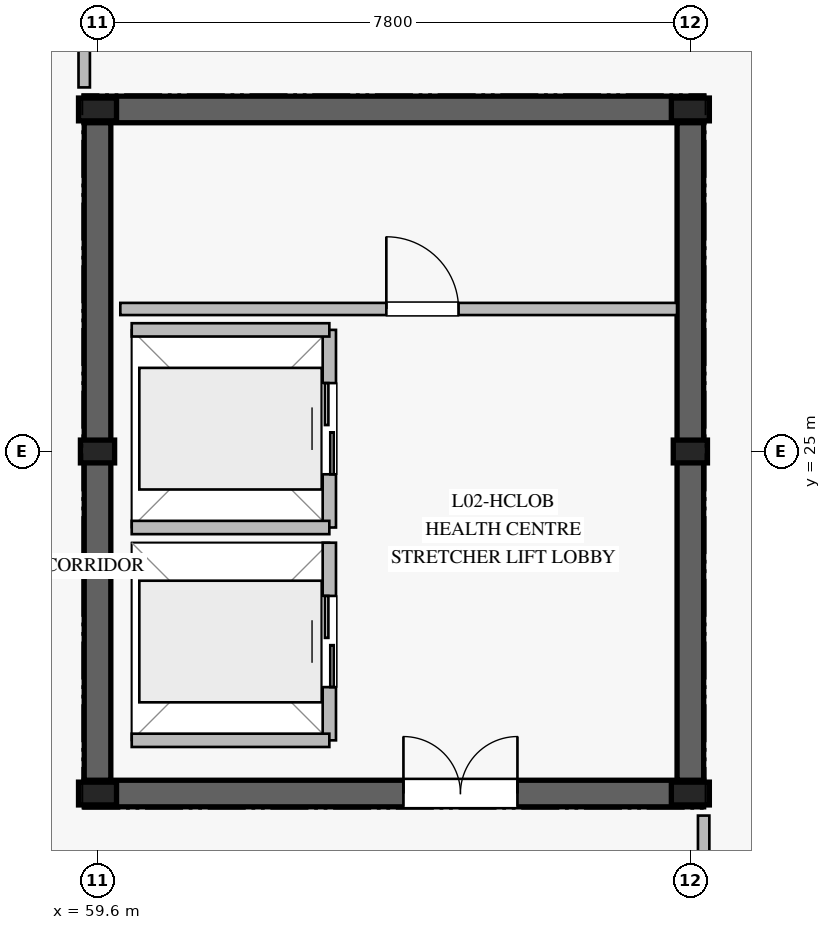
"""IFC4 building model, lengths in metres.
Left out: names, types, materials, properties, quantities, classifications, styles, units other than length and angle.
Written with IfcOpenShell. Run it as: python <this file> out.ifc"""

import sys

from ifc_helpers import new_model, si_unit, direction, frame, frame_2d, origin, origin_2d, place, context, subcontext, project, spatial, rectangle, i_section, extrude, element, fill, save


model = new_model("IFC4")
c1 = context("Model", 3, precision=1e-05, world=origin(), true_north=direction((0.0, 1.0)))
c2 = subcontext(c1, "Body", "Model", "MODEL_VIEW")
j1 = project(units=[si_unit("LENGTHUNIT", "METRE"), si_unit("PLANEANGLEUNIT", "RADIAN")], contexts=[c1])
p1 = place(None, origin())
s1 = spatial("IfcSite", under=j1, at=p1, CompositionType="ELEMENT")
p2 = place(p1, origin())
s2 = spatial("IfcBuilding", under=s1, at=p2, CompositionType="ELEMENT")
p3 = place(p2, frame((0.0, 0.0, 9.8)))
s3 = spatial("IfcBuildingStorey", under=s2, at=p3, CompositionType="ELEMENT", Elevation=9.8)
p4 = place(p3, frame((59.425, 20.5, 0.0), z_axis=(0.0, 0.0, 1.0), x_axis=(1.0, 0.0, 0.0)))
e1 = element("IfcWall", 1, at=p4, inside=s3, PredefinedType="SHEAR", context=c2, shape_type="SweptSolid", body=[
    extrude(rectangle(XDim=8.15, YDim=0.35, at=frame_2d((4.075, 0.0))), origin(), (0.0, 0.0, 1.0), 4.34),
])
p5 = place(p4, frame((4.2, 0.0, 0.0)))
e2 = element("IfcOpeningElement", 2, at=p5, cuts=e1, PredefinedType="OPENING", context=c2, shape_type="SweptSolid", body=[
    extrude(rectangle(XDim=1.5, YDim=2.2, at=frame_2d((0.75, 1.1))), frame((0.0, 0.185, 0.0), z_axis=(0.0, -1.0, 0.0), x_axis=(1.0, 0.0, 0.0)), (0.0, 0.0, 1.0), 0.37),
])
p6 = place(p3, frame((67.575, 29.5, 0.0), z_axis=(0.0, 0.0, 1.0), x_axis=(-1.0, 0.0, 0.0)))
e3 = element("IfcWall", 3, at=p6, inside=s3, PredefinedType="SHEAR", context=c2, shape_type="SweptSolid", body=[
    extrude(rectangle(XDim=8.15, YDim=0.35, at=frame_2d((4.075, 0.0))), origin(), (0.0, 0.0, 1.0), 4.34),
])
for number, where, z_axis, x_axis in (
    (4, (59.6, 29.325, 0.0), (0.0, 0.0, 1.0), (0.0, -1.0, 0.0)),
    (5, (67.4, 20.675, 0.0), (0.0, 0.0, 1.0), (0.0, 1.0, 0.0)),
):
    element("IfcWall", number, at=place(p3, frame(where, z_axis=z_axis, x_axis=x_axis)), inside=s3, PredefinedType="SHEAR", context=c2, shape_type="SweptSolid", body=[
        extrude(rectangle(XDim=8.65, YDim=0.35, at=frame_2d((4.325, 0.0))), origin(), (0.0, 0.0, 1.0), 4.34),
    ])
for number, where, z_axis, x_axis in (
    (6, (59.6, 20.5, 0.0), (0.0, 0.0, 1.0), (1.0, 0.0, 0.0)),
    (7, (67.4, 20.5, 0.0), (0.0, 0.0, 1.0), (1.0, 0.0, 0.0)),
    (8, (67.4, 29.5, 0.0), (0.0, 0.0, 1.0), (1.0, 0.0, 0.0)),
    (9, (59.6, 29.5, 0.0), (0.0, 0.0, 1.0), (1.0, 0.0, 0.0)),
):
    element("IfcColumn", number, at=place(p3, frame(where, z_axis=z_axis, x_axis=x_axis)), inside=s3, PredefinedType="COLUMN", context=c2, shape_type="SweptSolid", body=[
        extrude(i_section(OverallWidth=0.3, OverallDepth=0.5, WebThickness=0.014, FlangeThickness=0.028, at=origin_2d()), origin(), (0.0, 0.0, 1.0), 4.6),
    ])
for number, where, z_axis, x_axis in (
    (10, (59.6, 25.0, 0.0), (0.0, 0.0, 1.0), (1.0, 0.0, 0.0)),
    (11, (67.4, 25.0, 0.0), (0.0, 0.0, 1.0), (1.0, 0.0, 0.0)),
):
    element("IfcColumn", number, at=place(p3, frame(where, z_axis=z_axis, x_axis=x_axis)), inside=s3, PredefinedType="COLUMN", context=c2, shape_type="SweptSolid", body=[
        extrude(i_section(OverallWidth=0.3, OverallDepth=0.45, WebThickness=0.014, FlangeThickness=0.026, at=origin_2d()), origin(), (0.0, 0.0, 1.0), 4.6),
    ])
p7 = place(p3, frame((62.65, 21.2, 0.0), z_axis=(0.0, 0.0, 1.0), x_axis=(0.0, 1.0, 0.0)))
e12 = element("IfcWall", 12, at=p7, inside=s3, PredefinedType="PARTITIONING", context=c2, shape_type="SweptSolid", body=[
    extrude(rectangle(XDim=2.6, YDim=0.175, at=frame_2d((1.3, 0.0))), origin(), (0.0, 0.0, 1.0), 4.34),
])
p8 = place(p7, frame((0.7, 0.0, 0.0)))
e13 = element("IfcOpeningElement", 13, at=p8, cuts=e12, PredefinedType="OPENING", context=c2, shape_type="SweptSolid", body=[
    extrude(rectangle(XDim=1.2, YDim=2.2, at=frame_2d((0.6, 1.1))), frame((0.0, 0.098, 0.0), z_axis=(0.0, -1.0, 0.0), x_axis=(1.0, 0.0, 0.0)), (0.0, 0.0, 1.0), 0.195),
])
p9 = place(p3, frame((60.05, 21.2, 0.0), z_axis=(0.0, 0.0, 1.0), x_axis=(1.0, 0.0, 0.0)))
e14 = element("IfcWall", 14, at=p9, inside=s3, PredefinedType="PARTITIONING", context=c2, shape_type="SweptSolid", body=[
    extrude(rectangle(XDim=2.6, YDim=0.175, at=frame_2d((1.3, 0.0))), origin(), (0.0, 0.0, 1.0), 4.34),
])
p10 = place(p3, frame((62.65, 24.0, 0.0), z_axis=(0.0, 0.0, 1.0), x_axis=(0.0, 1.0, 0.0)))
e15 = element("IfcWall", 15, at=p10, inside=s3, PredefinedType="PARTITIONING", context=c2, shape_type="SweptSolid", body=[
    extrude(rectangle(XDim=2.6, YDim=0.175, at=frame_2d((1.3, 0.0))), origin(), (0.0, 0.0, 1.0), 3.98),
])
p11 = place(p10, frame((0.7, 0.0, 0.0)))
e16 = element("IfcOpeningElement", 16, at=p11, cuts=e15, PredefinedType="OPENING", context=c2, shape_type="SweptSolid", body=[
    extrude(rectangle(XDim=1.2, YDim=2.2, at=frame_2d((0.6, 1.1))), frame((0.0, 0.098, 0.0), z_axis=(0.0, -1.0, 0.0), x_axis=(1.0, 0.0, 0.0)), (0.0, 0.0, 1.0), 0.195),
])
for number, where, z_axis, x_axis in (
    (17, (60.05, 24.0, 0.0), (0.0, 0.0, 1.0), (1.0, 0.0, 0.0)),
    (18, (60.05, 26.6, 0.0), (0.0, 0.0, 1.0), (1.0, 0.0, 0.0)),
):
    element("IfcWall", number, at=place(p3, frame(where, z_axis=z_axis, x_axis=x_axis)), inside=s3, PredefinedType="PARTITIONING", context=c2, shape_type="SweptSolid", body=[
        extrude(rectangle(XDim=2.6, YDim=0.175, at=frame_2d((1.3, 0.0))), origin(), (0.0, 0.0, 1.0), 4.34),
    ])
p12 = place(p3, frame((59.9, 26.875, 0.0), z_axis=(0.0, 0.0, 1.0), x_axis=(1.0, 0.0, 0.0)))
e19 = element("IfcWall", 19, at=p12, inside=s3, PredefinedType="PLUMBINGWALL", context=c2, shape_type="SweptSolid", body=[
    extrude(rectangle(XDim=7.325, YDim=0.16, at=frame_2d((3.663, 0.0))), origin(), (0.0, 0.0, 1.0), 3.98),
])
p13 = place(p12, frame((3.5, 0.0, 0.0)))
e20 = element("IfcOpeningElement", 20, at=p13, cuts=e19, PredefinedType="OPENING", context=c2, shape_type="SweptSolid", body=[
    extrude(rectangle(XDim=0.95, YDim=2.1, at=frame_2d((0.475, 1.05))), frame((0.0, 0.09, 0.0), z_axis=(0.0, -1.0, 0.0), x_axis=(1.0, 0.0, 0.0)), (0.0, 0.0, 1.0), 0.18),
])
for number, where, z_axis, x_axis in (
    (21, (59.425, 29.79, 0.0), (0.0, 0.0, 1.0), (0.0, 1.0, 0.0)),
    (22, (67.575, 19.265, 0.0), (0.0, 0.0, 1.0), (0.0, 1.0, 0.0)),
):
    element("IfcWall", number, at=place(p3, frame(where, z_axis=z_axis, x_axis=x_axis)), inside=s3, PredefinedType="PARTITIONING", context=c2, shape_type="SweptSolid", body=[
        extrude(rectangle(XDim=0.945, YDim=0.15, at=frame_2d((0.473, 0.0))), origin(), (0.0, 0.0, 1.0), 3.98),
    ])
p14 = place(p8, origin())
e23 = element("IfcDoor", 23, at=p14, inside=s3, OperationType="DOUBLE_DOOR_SLIDING", PredefinedType="DOOR", context=c2, shape_type="SweptSolid", body=[
    extrude(rectangle(XDim=1.2, YDim=2.2, at=frame_2d((0.6, 1.1))), frame((0.0, 0.025, 0.0), z_axis=(0.0, -1.0, 0.0), x_axis=(1.0, 0.0, 0.0)), (0.0, 0.0, 1.0), 0.05),
])
fill(e13, e23)
p15 = place(p11, origin())
e24 = element("IfcDoor", 24, at=p15, inside=s3, OperationType="DOUBLE_DOOR_SLIDING", PredefinedType="DOOR", context=c2, shape_type="SweptSolid", body=[
    extrude(rectangle(XDim=1.2, YDim=2.2, at=frame_2d((0.6, 1.1))), frame((0.0, 0.025, 0.0), z_axis=(0.0, -1.0, 0.0), x_axis=(1.0, 0.0, 0.0)), (0.0, 0.0, 1.0), 0.05),
])
fill(e16, e24)
p16 = place(p5, origin())
e25 = element("IfcDoor", 25, at=p16, inside=s3, OperationType="DOUBLE_DOOR_SINGLE_SWING", PredefinedType="DOOR", context=c2, shape_type="SweptSolid", body=[
    extrude(rectangle(XDim=1.5, YDim=2.2, at=frame_2d((0.75, 1.1))), frame((0.0, 0.025, 0.0), z_axis=(0.0, -1.0, 0.0), x_axis=(1.0, 0.0, 0.0)), (0.0, 0.0, 1.0), 0.05),
])
fill(e2, e25)
p17 = place(p13, origin())
e26 = element("IfcDoor", 26, at=p17, inside=s3, OperationType="SINGLE_SWING_LEFT", PredefinedType="DOOR", context=c2, shape_type="SweptSolid", body=[
    extrude(rectangle(XDim=0.95, YDim=2.1, at=frame_2d((0.475, 1.05))), frame((0.0, 0.025, 0.0), z_axis=(0.0, -1.0, 0.0), x_axis=(1.0, 0.0, 0.0)), (0.0, 0.0, 1.0), 0.05),
])
fill(e20, e26)
save(model, sys.argv[1])
